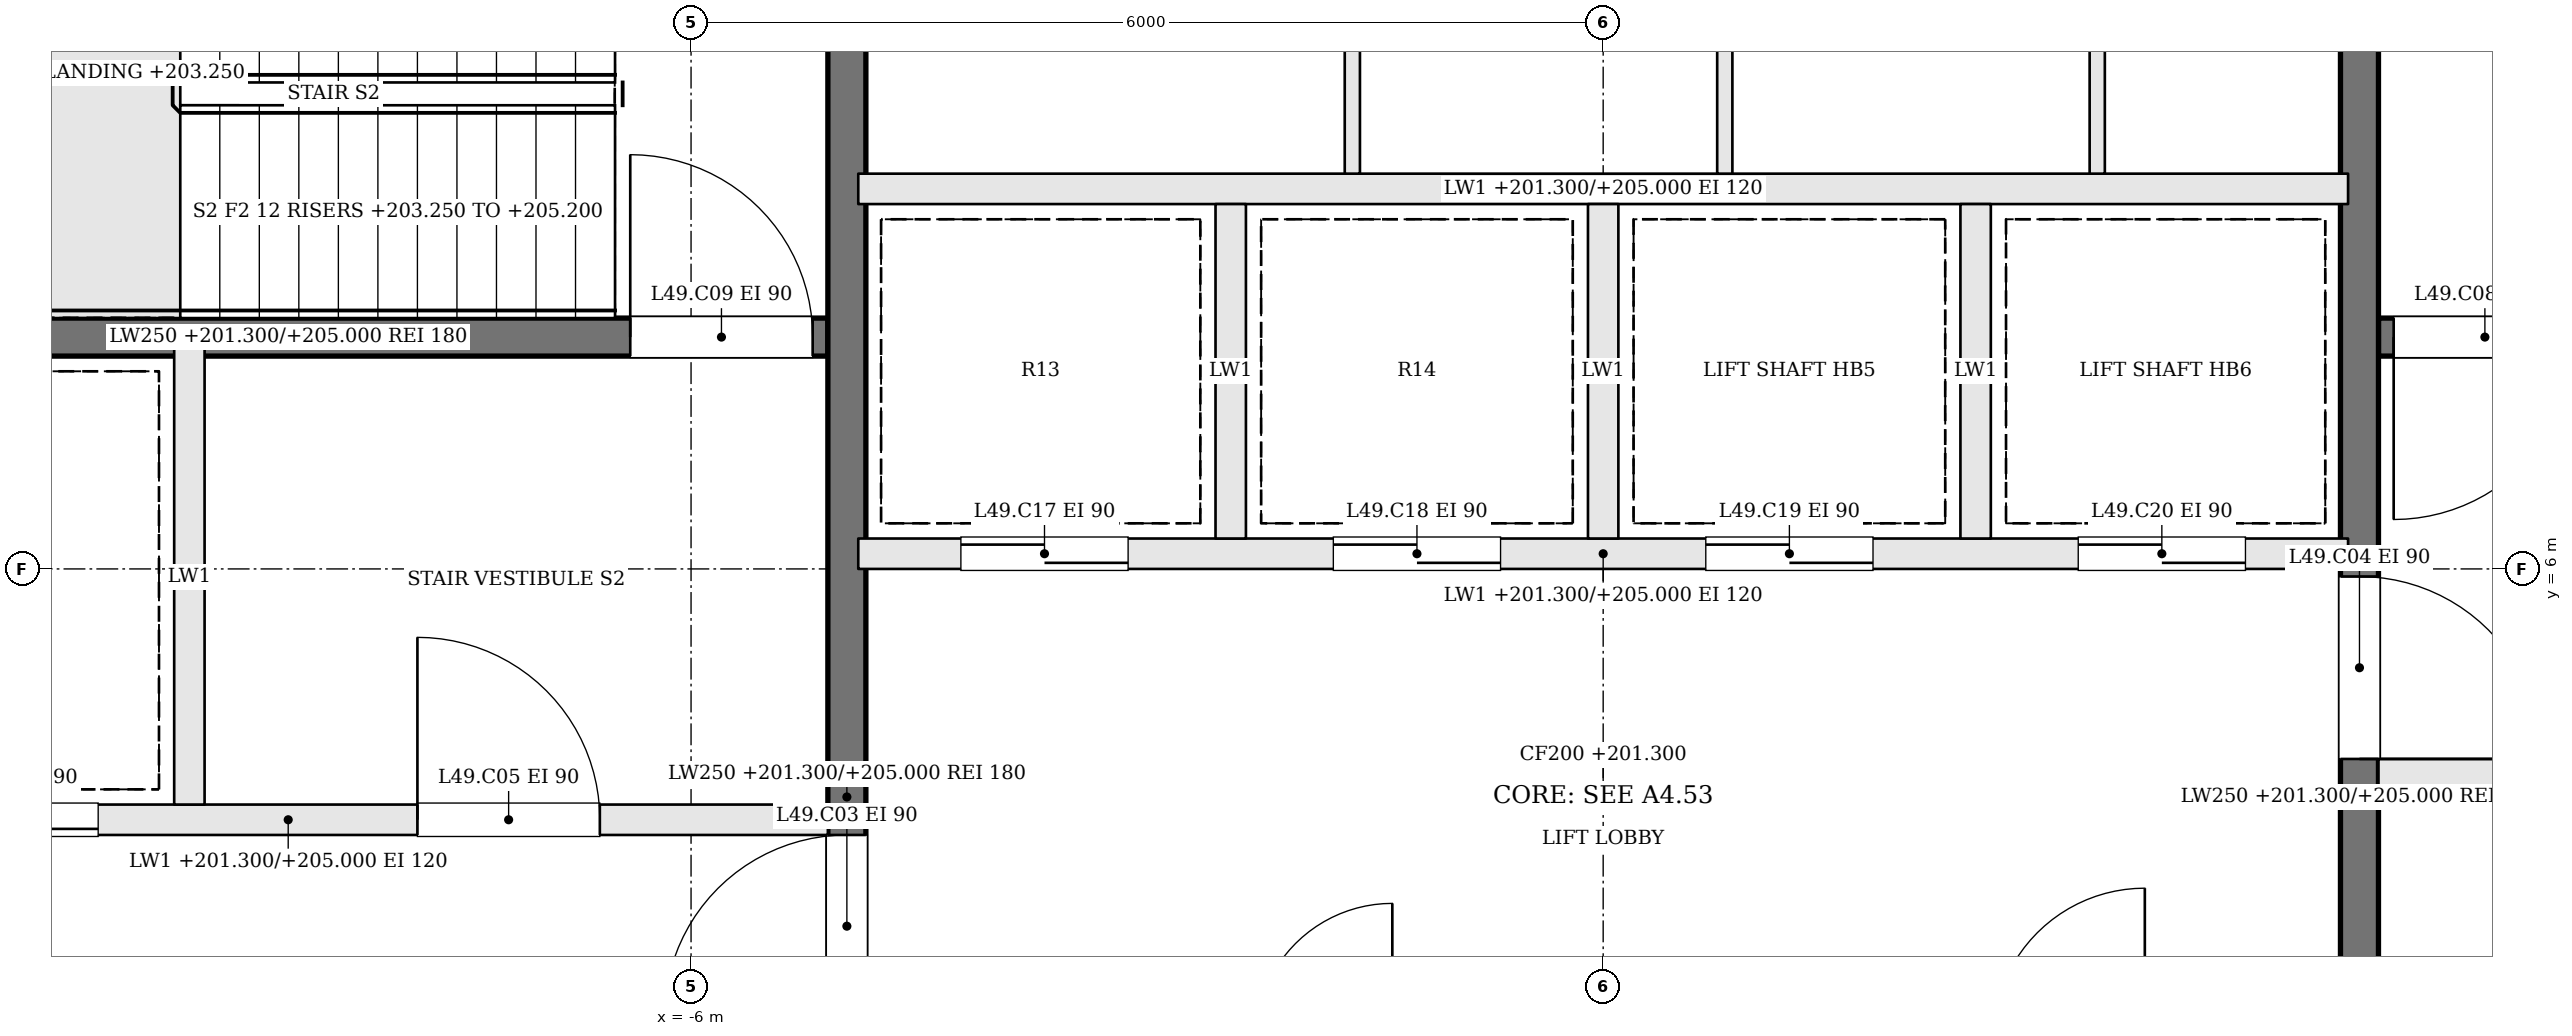
"""IFC4 building model, lengths in metres.
Left out: names, types, materials, properties, quantities, classifications, styles, units other than length and angle.
Written with IfcOpenShell. Run it as: python <this file> out.ifc"""

import sys

from ifc_helpers import new_model, si_unit, direction, frame, frame_2d, origin, place, context, subcontext, project, spatial, rectangle, extrude, element, fill, save


model = new_model("IFC4")
c1 = context("Model", 3, precision=1e-05, world=origin(), true_north=direction((0.0, 1.0)))
c2 = subcontext(c1, "Body", "Model", "MODEL_VIEW")
j1 = project(units=[si_unit("LENGTHUNIT", "METRE"), si_unit("PLANEANGLEUNIT", "RADIAN")], contexts=[c1])
p1 = place(None, origin())
s1 = spatial("IfcSite", under=j1, at=p1, CompositionType="ELEMENT")
p2 = place(p1, origin())
s2 = spatial("IfcBuilding", under=s1, at=p2, CompositionType="ELEMENT")
p3 = place(p2, frame((0.0, 0.0, 201.3)))
s3 = spatial("IfcBuildingStorey", under=s2, at=p3, CompositionType="ELEMENT", Elevation=201.3)
p4 = place(p3, frame((12.2, 7.525, 0.0), z_axis=(0.0, 0.0, 1.0), x_axis=(-1.0, 0.0, 0.0)))
e1 = element("IfcWall", 1, at=p4, inside=s3, PredefinedType="SOLIDWALL", context=c2, shape_type="SweptSolid", body=[
    extrude(rectangle(XDim=7.1, YDim=0.25, at=frame_2d((3.55, 0.0))), origin(), (0.0, 0.0, 1.0), 3.7),
])
p5 = place(p4, frame((5.8, 0.0, 0.0)))
e2 = element("IfcOpeningElement", 2, at=p5, cuts=e1, PredefinedType="OPENING", context=c2, shape_type="SweptSolid", body=[
    extrude(rectangle(XDim=1.2, YDim=2.1, at=frame_2d((0.6, 1.05))), frame((0.0, 0.135, 0.0), z_axis=(0.0, -1.0, 0.0), x_axis=(1.0, 0.0, 0.0)), (0.0, 0.0, 1.0), 0.27),
])
p6 = place(p3, frame((-12.2, 4.35, 0.0), z_axis=(0.0, 0.0, 1.0), x_axis=(1.0, 0.0, 0.0)))
e3 = element("IfcWall", 3, at=p6, inside=s3, PredefinedType="SOLIDWALL", context=c2, shape_type="SweptSolid", body=[
    extrude(rectangle(XDim=7.1, YDim=0.2, at=frame_2d((3.55, 0.0))), origin(), (0.0, 0.0, 1.0), 3.7),
])
p7 = place(p6, frame((4.4, 0.0, 0.0)))
e4 = element("IfcOpeningElement", 4, at=p7, cuts=e3, PredefinedType="OPENING", context=c2, shape_type="SweptSolid", body=[
    extrude(rectangle(XDim=1.2, YDim=2.1, at=frame_2d((0.6, 1.05))), frame((0.0, 0.11, 0.0), z_axis=(0.0, -1.0, 0.0), x_axis=(1.0, 0.0, 0.0)), (0.0, 0.0, 1.0), 0.22),
])
p8 = place(p6, frame((1.1, 0.0, 0.0)))
e5 = element("IfcOpeningElement", 5, at=p8, cuts=e3, PredefinedType="OPENING", context=c2, shape_type="SweptSolid", body=[
    extrude(rectangle(XDim=1.2, YDim=2.1, at=frame_2d((0.6, 1.05))), frame((0.0, 0.11, 0.0), z_axis=(0.0, -1.0, 0.0), x_axis=(1.0, 0.0, 0.0)), (0.0, 0.0, 1.0), 0.22),
])
p9 = place(p3, frame((12.2, 4.65, 0.0), z_axis=(0.0, 0.0, 1.0), x_axis=(-1.0, 0.0, 0.0)))
e6 = element("IfcWall", 6, at=p9, inside=s3, PredefinedType="SOLIDWALL", context=c2, shape_type="SweptSolid", body=[
    extrude(rectangle(XDim=7.1, YDim=0.2, at=frame_2d((3.55, 0.0))), origin(), (0.0, 0.0, 1.0), 3.7),
])
p10 = place(p9, frame((4.4, 0.0, 0.0)))
e7 = element("IfcOpeningElement", 7, at=p10, cuts=e6, PredefinedType="OPENING", context=c2, shape_type="SweptSolid", body=[
    extrude(rectangle(XDim=1.2, YDim=2.1, at=frame_2d((0.6, 1.05))), frame((0.0, 0.11, 0.0), z_axis=(0.0, -1.0, 0.0), x_axis=(1.0, 0.0, 0.0)), (0.0, 0.0, 1.0), 0.22),
])
p11 = place(p9, frame((1.1, 0.0, 0.0)))
e8 = element("IfcOpeningElement", 8, at=p11, cuts=e6, PredefinedType="OPENING", context=c2, shape_type="SweptSolid", body=[
    extrude(rectangle(XDim=1.2, YDim=2.1, at=frame_2d((0.6, 1.05))), frame((0.0, 0.11, 0.0), z_axis=(0.0, -1.0, 0.0), x_axis=(1.0, 0.0, 0.0)), (0.0, 0.0, 1.0), 0.22),
])
p12 = place(p3, frame((-12.2, 7.525, 0.0), z_axis=(0.0, 0.0, 1.0), x_axis=(1.0, 0.0, 0.0)))
e9 = element("IfcWall", 9, at=p12, inside=s3, PredefinedType="SOLIDWALL", context=c2, shape_type="SweptSolid", body=[
    extrude(rectangle(XDim=7.1, YDim=0.25, at=frame_2d((3.55, 0.0))), origin(), (0.0, 0.0, 1.0), 3.7),
])
p13 = place(p12, frame((5.8, 0.0, 0.0)))
e10 = element("IfcOpeningElement", 10, at=p13, cuts=e9, PredefinedType="OPENING", context=c2, shape_type="SweptSolid", body=[
    extrude(rectangle(XDim=1.2, YDim=2.1, at=frame_2d((0.6, 1.05))), frame((0.0, 0.135, 0.0), z_axis=(0.0, -1.0, 0.0), x_axis=(1.0, 0.0, 0.0)), (0.0, 0.0, 1.0), 0.27),
])
p14 = place(p3, frame((-9.3, 4.45, 0.0), z_axis=(0.0, 0.0, 1.0), x_axis=(0.0, 1.0, 0.0)))
e11 = element("IfcWall", 11, at=p14, inside=s3, PredefinedType="SOLIDWALL", context=c2, shape_type="SweptSolid", body=[
    extrude(rectangle(XDim=3.0, YDim=0.2, at=frame_2d((1.5, 0.0))), origin(), (0.0, 0.0, 1.0), 3.7),
])
p15 = place(p3, frame((-4.975, -2.2, 0.0), z_axis=(0.0, 0.0, 1.0), x_axis=(0.0, 1.0, 0.0)))
e12 = element("IfcWall", 12, at=p15, inside=s3, PredefinedType="SOLIDWALL", context=c2, shape_type="SweptSolid", body=[
    extrude(rectangle(XDim=13.4, YDim=0.25, at=frame_2d((6.7, 0.0))), origin(), (0.0, 0.0, 1.0), 3.7),
])
p16 = place(p15, frame((5.25, 0.0, 0.0)))
e13 = element("IfcOpeningElement", 13, at=p16, cuts=e12, PredefinedType="OPENING", context=c2, shape_type="SweptSolid", body=[
    extrude(rectangle(XDim=1.2, YDim=2.1, at=frame_2d((0.6, 1.05))), frame((0.0, 0.135, 0.0), z_axis=(0.0, -1.0, 0.0), x_axis=(1.0, 0.0, 0.0)), (0.0, 0.0, 1.0), 0.27),
])
p17 = place(p3, frame((4.975, 11.2, 0.0), z_axis=(0.0, 0.0, 1.0), x_axis=(0.0, -1.0, 0.0)))
e14 = element("IfcWall", 14, at=p17, inside=s3, PredefinedType="SOLIDWALL", context=c2, shape_type="SweptSolid", body=[
    extrude(rectangle(XDim=13.4, YDim=0.25, at=frame_2d((6.7, 0.0))), origin(), (0.0, 0.0, 1.0), 3.7),
])
p18 = place(p17, frame((5.25, 0.0, 0.0)))
e15 = element("IfcOpeningElement", 15, at=p18, cuts=e14, PredefinedType="OPENING", context=c2, shape_type="SweptSolid", body=[
    extrude(rectangle(XDim=1.2, YDim=2.1, at=frame_2d((0.6, 1.05))), frame((0.0, 0.135, 0.0), z_axis=(0.0, -1.0, 0.0), x_axis=(1.0, 0.0, 0.0)), (0.0, 0.0, 1.0), 0.27),
])
p19 = place(p3, frame((-4.9, 6.1, 0.0), z_axis=(0.0, 0.0, 1.0), x_axis=(1.0, 0.0, 0.0)))
e16 = element("IfcWall", 16, at=p19, inside=s3, PredefinedType="SOLIDWALL", context=c2, shape_type="SweptSolid", body=[
    extrude(rectangle(XDim=9.8, YDim=0.2, at=frame_2d((4.9, 0.0))), origin(), (0.0, 0.0, 1.0), 3.7),
])
p20 = place(p19, frame((0.675, 0.0, 0.0)))
e17 = element("IfcOpeningElement", 17, at=p20, cuts=e16, PredefinedType="OPENING", context=c2, shape_type="SweptSolid", body=[
    extrude(rectangle(XDim=1.1, YDim=2.1, at=frame_2d((0.55, 1.05))), frame((0.0, 0.11, 0.0), z_axis=(0.0, -1.0, 0.0), x_axis=(1.0, 0.0, 0.0)), (0.0, 0.0, 1.0), 0.22),
])
p21 = place(p19, frame((3.125, 0.0, 0.0)))
e18 = element("IfcOpeningElement", 18, at=p21, cuts=e16, PredefinedType="OPENING", context=c2, shape_type="SweptSolid", body=[
    extrude(rectangle(XDim=1.1, YDim=2.1, at=frame_2d((0.55, 1.05))), frame((0.0, 0.11, 0.0), z_axis=(0.0, -1.0, 0.0), x_axis=(1.0, 0.0, 0.0)), (0.0, 0.0, 1.0), 0.22),
])
p22 = place(p19, frame((5.575, 0.0, 0.0)))
e19 = element("IfcOpeningElement", 19, at=p22, cuts=e16, PredefinedType="OPENING", context=c2, shape_type="SweptSolid", body=[
    extrude(rectangle(XDim=1.1, YDim=2.1, at=frame_2d((0.55, 1.05))), frame((0.0, 0.11, 0.0), z_axis=(0.0, -1.0, 0.0), x_axis=(1.0, 0.0, 0.0)), (0.0, 0.0, 1.0), 0.22),
])
p23 = place(p19, frame((8.025, 0.0, 0.0)))
e20 = element("IfcOpeningElement", 20, at=p23, cuts=e16, PredefinedType="OPENING", context=c2, shape_type="SweptSolid", body=[
    extrude(rectangle(XDim=1.1, YDim=2.1, at=frame_2d((0.55, 1.05))), frame((0.0, 0.11, 0.0), z_axis=(0.0, -1.0, 0.0), x_axis=(1.0, 0.0, 0.0)), (0.0, 0.0, 1.0), 0.22),
])
p24 = place(p3, frame((-4.9, 8.5, 0.0), z_axis=(0.0, 0.0, 1.0), x_axis=(1.0, 0.0, 0.0)))
e21 = element("IfcWall", 21, at=p24, inside=s3, PredefinedType="SOLIDWALL", context=c2, shape_type="SweptSolid", body=[
    extrude(rectangle(XDim=9.8, YDim=0.2, at=frame_2d((4.9, 0.0))), origin(), (0.0, 0.0, 1.0), 3.7),
])
for number, where, z_axis, x_axis in (
    (22, (-2.45, 6.2, 0.0), (0.0, 0.0, 1.0), (0.0, 1.0, 0.0)),
    (23, (0.0, 6.2, 0.0), (0.0, 0.0, 1.0), (0.0, 1.0, 0.0)),
    (24, (2.45, 6.2, 0.0), (0.0, 0.0, 1.0), (0.0, 1.0, 0.0)),
):
    element("IfcWall", number, at=place(p3, frame(where, z_axis=z_axis, x_axis=x_axis)), inside=s3, PredefinedType="SOLIDWALL", context=c2, shape_type="SweptSolid", body=[
        extrude(rectangle(XDim=2.2, YDim=0.2, at=frame_2d((1.1, 0.0))), origin(), (0.0, 0.0, 1.0), 3.7),
    ])
for number, where, z_axis, x_axis in (
    (25, (-1.65, 8.6, 0.0), (0.0, 0.0, 1.0), (0.0, 1.0, 0.0)),
    (26, (0.8, 8.6, 0.0), (0.0, 0.0, 1.0), (0.0, 1.0, 0.0)),
    (27, (3.25, 8.6, 0.0), (0.0, 0.0, 1.0), (0.0, 1.0, 0.0)),
):
    element("IfcWall", number, at=place(p3, frame(where, z_axis=z_axis, x_axis=x_axis)), inside=s3, PredefinedType="PARTITIONING", context=c2, shape_type="SweptSolid", body=[
        extrude(rectangle(XDim=2.6, YDim=0.1, at=frame_2d((1.3, 0.0))), origin(), (0.0, 0.0, 1.0), 3.7),
    ])
p25 = place(p16, origin())
e28 = element("IfcDoor", 28, at=p25, inside=s3, OperationType="SINGLE_SWING_LEFT", PredefinedType="DOOR", context=c2, shape_type="SweptSolid", body=[
    extrude(rectangle(XDim=1.2, YDim=2.1, at=frame_2d((0.6, 1.05))), frame((0.0, 0.025, 0.0), z_axis=(0.0, -1.0, 0.0), x_axis=(1.0, 0.0, 0.0)), (0.0, 0.0, 1.0), 0.05),
])
fill(e13, e28)
p26 = place(p18, origin())
e29 = element("IfcDoor", 29, at=p26, inside=s3, OperationType="SINGLE_SWING_RIGHT", PredefinedType="DOOR", context=c2, shape_type="SweptSolid", body=[
    extrude(rectangle(XDim=1.2, YDim=2.1, at=frame_2d((0.6, 1.05))), frame((0.0, 0.025, 0.0), z_axis=(0.0, -1.0, 0.0), x_axis=(1.0, 0.0, 0.0)), (0.0, 0.0, 1.0), 0.05),
])
fill(e15, e29)
p27 = place(p7, origin())
e30 = element("IfcDoor", 30, at=p27, inside=s3, OperationType="SINGLE_SWING_LEFT", PredefinedType="DOOR", context=c2, shape_type="SweptSolid", body=[
    extrude(rectangle(XDim=1.2, YDim=2.1, at=frame_2d((0.6, 1.05))), frame((0.0, 0.025, 0.0), z_axis=(0.0, -1.0, 0.0), x_axis=(1.0, 0.0, 0.0)), (0.0, 0.0, 1.0), 0.05),
])
fill(e4, e30)
p28 = place(p5, origin())
e31 = element("IfcDoor", 31, at=p28, inside=s3, OperationType="SINGLE_SWING_RIGHT", PredefinedType="DOOR", context=c2, shape_type="SweptSolid", body=[
    extrude(rectangle(XDim=1.2, YDim=2.1, at=frame_2d((0.6, 1.05))), frame((0.0, 0.025, 0.0), z_axis=(0.0, -1.0, 0.0), x_axis=(1.0, 0.0, 0.0)), (0.0, 0.0, 1.0), 0.05),
])
fill(e2, e31)
p29 = place(p13, origin())
e32 = element("IfcDoor", 32, at=p29, inside=s3, OperationType="SINGLE_SWING_LEFT", PredefinedType="DOOR", context=c2, shape_type="SweptSolid", body=[
    extrude(rectangle(XDim=1.2, YDim=2.1, at=frame_2d((0.6, 1.05))), frame((0.0, 0.025, 0.0), z_axis=(0.0, -1.0, 0.0), x_axis=(1.0, 0.0, 0.0)), (0.0, 0.0, 1.0), 0.05),
])
fill(e10, e32)
p30 = place(p8, origin())
e33 = element("IfcDoor", 33, at=p30, inside=s3, OperationType="SLIDING_TO_RIGHT", PredefinedType="DOOR", context=c2, shape_type="SweptSolid", body=[
    extrude(rectangle(XDim=1.2, YDim=2.1, at=frame_2d((0.6, 1.05))), frame((0.0, 0.025, 0.0), z_axis=(0.0, -1.0, 0.0), x_axis=(1.0, 0.0, 0.0)), (0.0, 0.0, 1.0), 0.05),
])
fill(e5, e33)
p31 = place(p20, origin())
e34 = element("IfcDoor", 34, at=p31, inside=s3, OperationType="SLIDING_TO_RIGHT", PredefinedType="DOOR", context=c2, shape_type="SweptSolid", body=[
    extrude(rectangle(XDim=1.1, YDim=2.1, at=frame_2d((0.55, 1.05))), frame((0.0, 0.025, 0.0), z_axis=(0.0, -1.0, 0.0), x_axis=(1.0, 0.0, 0.0)), (0.0, 0.0, 1.0), 0.05),
])
fill(e17, e34)
p32 = place(p21, origin())
e35 = element("IfcDoor", 35, at=p32, inside=s3, OperationType="SLIDING_TO_LEFT", PredefinedType="DOOR", context=c2, shape_type="SweptSolid", body=[
    extrude(rectangle(XDim=1.1, YDim=2.1, at=frame_2d((0.55, 1.05))), frame((0.0, 0.025, 0.0), z_axis=(0.0, -1.0, 0.0), x_axis=(1.0, 0.0, 0.0)), (0.0, 0.0, 1.0), 0.05),
])
fill(e18, e35)
p33 = place(p22, origin())
e36 = element("IfcDoor", 36, at=p33, inside=s3, OperationType="SLIDING_TO_RIGHT", PredefinedType="DOOR", context=c2, shape_type="SweptSolid", body=[
    extrude(rectangle(XDim=1.1, YDim=2.1, at=frame_2d((0.55, 1.05))), frame((0.0, 0.025, 0.0), z_axis=(0.0, -1.0, 0.0), x_axis=(1.0, 0.0, 0.0)), (0.0, 0.0, 1.0), 0.05),
])
fill(e19, e36)
p34 = place(p23, origin())
e37 = element("IfcDoor", 37, at=p34, inside=s3, OperationType="SLIDING_TO_LEFT", PredefinedType="DOOR", context=c2, shape_type="SweptSolid", body=[
    extrude(rectangle(XDim=1.1, YDim=2.1, at=frame_2d((0.55, 1.05))), frame((0.0, 0.025, 0.0), z_axis=(0.0, -1.0, 0.0), x_axis=(1.0, 0.0, 0.0)), (0.0, 0.0, 1.0), 0.05),
])
fill(e20, e37)
save(model, sys.argv[1])
